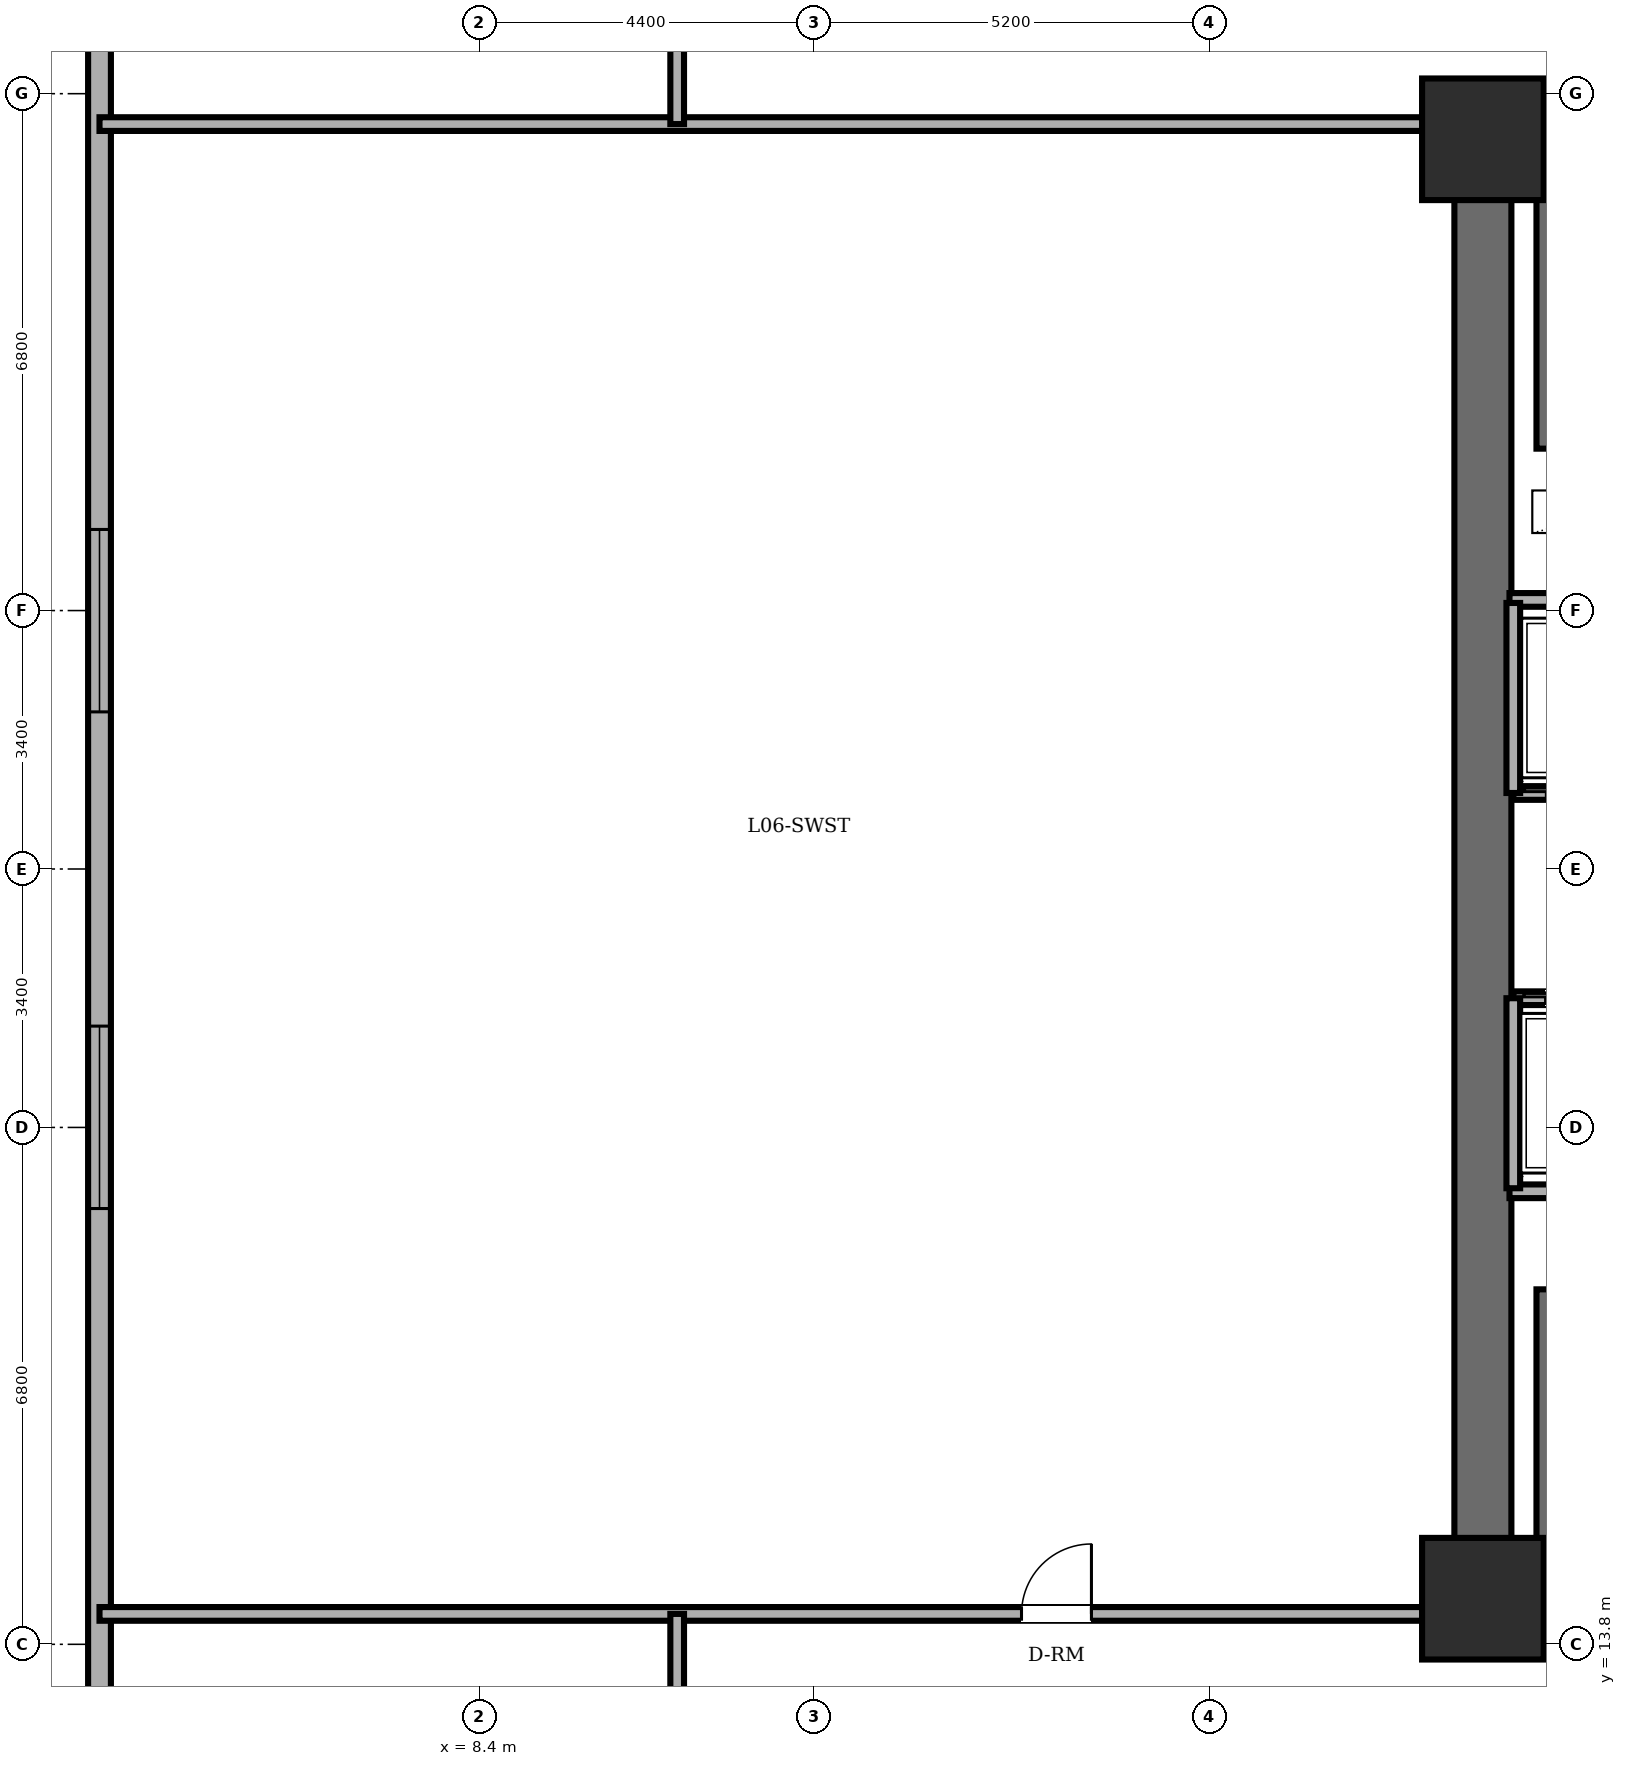
"""IFC4 building model, lengths in metres.
Left out: names, types, materials, properties, quantities, classifications, styles, units other than length and angle.
Written with IfcOpenShell. Run it as: python <this file> out.ifc"""

import sys

from ifc_helpers import new_model, si_unit, direction, frame, frame_2d, origin, origin_2d, place, context, subcontext, project, spatial, rectangle, extrude, element, fill, save


model = new_model("IFC4")
c1 = context("Model", 3, precision=1e-05, world=origin(), true_north=direction((0.0, 1.0)))
c2 = subcontext(c1, "Body", "Model", "MODEL_VIEW")
j1 = project(units=[si_unit("LENGTHUNIT", "METRE"), si_unit("PLANEANGLEUNIT", "RADIAN")], contexts=[c1])
p1 = place(None, origin())
s1 = spatial("IfcSite", under=j1, at=p1, CompositionType="ELEMENT")
p2 = place(p1, origin())
s2 = spatial("IfcBuilding", under=s1, at=p2, CompositionType="ELEMENT")
p3 = place(p2, frame((0.0, 0.0, 24.0)))
s3 = spatial("IfcBuildingStorey", under=s2, at=p3, CompositionType="ELEMENT", Elevation=24.0)
for number, where, z_axis, x_axis in (
    (1, (21.6, 14.4, 0.0), (0.0, 0.0, 1.0), (1.0, 0.0, 0.0)),
    (2, (21.6, 33.6, 0.0), (0.0, 0.0, 1.0), (1.0, 0.0, 0.0)),
):
    element("IfcColumn", number, at=place(p3, frame(where, z_axis=z_axis, x_axis=x_axis)), inside=s3, PredefinedType="COLUMN", context=c2, shape_type="SweptSolid", body=[
        extrude(rectangle(XDim=1.6, YDim=1.6, at=origin_2d()), origin(), (0.0, 0.0, 1.0), 4.8),
    ])
p4 = place(p3, frame((3.4, 40.2, 0.0), z_axis=(0.0, 0.0, 1.0), x_axis=(0.0, -1.0, 0.0)))
e3 = element("IfcWall", 3, at=p4, inside=s3, PredefinedType="SOLIDWALL", context=c2, shape_type="SweptSolid", body=[
    extrude(rectangle(XDim=32.4, YDim=0.3, at=frame_2d((16.2, 0.0))), origin(), (0.0, 0.0, 1.0), 4.6),
])
p5 = place(p4, frame((2.175, 0.0, 0.85)))
e4 = element("IfcOpeningElement", 4, at=p5, cuts=e3, PredefinedType="OPENING", context=c2, shape_type="SweptSolid", body=[
    extrude(rectangle(XDim=2.4, YDim=2.1, at=frame_2d((1.2, 1.05))), frame((0.0, 0.16, 0.0), z_axis=(0.0, -1.0, 0.0), x_axis=(1.0, 0.0, 0.0)), (0.0, 0.0, 1.0), 0.32),
])
p6 = place(p4, frame((11.733, 0.0, 0.85)))
e5 = element("IfcOpeningElement", 5, at=p6, cuts=e3, PredefinedType="OPENING", context=c2, shape_type="SweptSolid", body=[
    extrude(rectangle(XDim=2.4, YDim=2.1, at=frame_2d((1.2, 1.05))), frame((0.0, 0.16, 0.0), z_axis=(0.0, -1.0, 0.0), x_axis=(1.0, 0.0, 0.0)), (0.0, 0.0, 1.0), 0.32),
])
p7 = place(p4, frame((18.267, 0.0, 0.85)))
e6 = element("IfcOpeningElement", 6, at=p7, cuts=e3, PredefinedType="OPENING", context=c2, shape_type="SweptSolid", body=[
    extrude(rectangle(XDim=2.4, YDim=2.1, at=frame_2d((1.2, 1.05))), frame((0.0, 0.16, 0.0), z_axis=(0.0, -1.0, 0.0), x_axis=(1.0, 0.0, 0.0)), (0.0, 0.0, 1.0), 0.32),
])
p8 = place(p4, frame((27.825, 0.0, 0.85)))
e7 = element("IfcOpeningElement", 7, at=p8, cuts=e3, PredefinedType="OPENING", context=c2, shape_type="SweptSolid", body=[
    extrude(rectangle(XDim=2.4, YDim=2.1, at=frame_2d((1.2, 1.05))), frame((0.0, 0.16, 0.0), z_axis=(0.0, -1.0, 0.0), x_axis=(1.0, 0.0, 0.0)), (0.0, 0.0, 1.0), 0.32),
])
p9 = place(p3, frame((21.6, 14.4, 0.0), z_axis=(0.0, 0.0, 1.0), x_axis=(0.0, 1.0, 0.0)))
e8 = element("IfcWall", 8, at=p9, inside=s3, PredefinedType="SHEAR", context=c2, shape_type="SweptSolid", body=[
    extrude(rectangle(XDim=19.2, YDim=0.75, at=frame_2d((9.6, 0.0))), origin(), (0.0, 0.0, 1.0), 4.6),
])
for number, where, z_axis, x_axis in (
    (9, (21.6, 33.6, 0.0), (0.0, 0.0, 1.0), (1.0, 0.0, 0.0)),
    (10, (37.2, 14.4, 0.0), (0.0, 0.0, 1.0), (-1.0, 0.0, 0.0)),
):
    element("IfcWall", number, at=place(p3, frame(where, z_axis=z_axis, x_axis=x_axis)), inside=s3, PredefinedType="SHEAR", context=c2, shape_type="SweptSolid", body=[
        extrude(rectangle(XDim=15.6, YDim=0.75, at=frame_2d((7.8, 0.0))), origin(), (0.0, 0.0, 1.0), 4.6),
    ])
for number, where, z_axis, x_axis in (
    (11, (22.48, 29.53, 0.0), (0.0, 0.0, 1.0), (0.0, 1.0, 0.0)),
    (12, (22.48, 14.89, 0.0), (0.0, 0.0, 1.0), (0.0, 1.0, 0.0)),
):
    element("IfcWall", number, at=place(p3, frame(where, z_axis=z_axis, x_axis=x_axis)), inside=s3, PredefinedType="SOLIDWALL", context=c2, shape_type="SweptSolid", body=[
        extrude(rectangle(XDim=3.58, YDim=0.35, at=frame_2d((1.79, 0.0))), origin(), (0.0, 0.0, 1.0), 4.6),
    ])
p10 = place(p3, frame((21.95, 27.54, 0.0), z_axis=(0.0, 0.0, 1.0), x_axis=(1.0, 0.0, 0.0)))
e13 = element("IfcWall", 13, at=p10, inside=s3, PredefinedType="PARTITIONING", context=c2, shape_type="SweptSolid", body=[
    extrude(rectangle(XDim=10.56, YDim=0.18, at=frame_2d((5.28, 0.0))), origin(), (0.0, 0.0, 1.0), 4.6),
])
p11 = place(p3, frame((21.95, 19.76, 0.0), z_axis=(0.0, 0.0, 1.0), x_axis=(1.0, 0.0, 0.0)))
e14 = element("IfcWall", 14, at=p11, inside=s3, PredefinedType="PARTITIONING", context=c2, shape_type="SweptSolid", body=[
    extrude(rectangle(XDim=14.87, YDim=0.18, at=frame_2d((7.435, 0.0))), origin(), (0.0, 0.0, 1.0), 4.6),
])
p12 = place(p3, frame((24.02, 25.0, 0.0), z_axis=(0.0, 0.0, 1.0), x_axis=(-1.0, 0.0, 0.0)))
e15 = element("IfcWall", 15, at=p12, inside=s3, PredefinedType="PARTITIONING", context=c2, shape_type="SweptSolid", body=[
    extrude(rectangle(XDim=2.02, YDim=0.18, at=frame_2d((1.01, 0.0))), origin(), (0.0, 0.0, 1.0), 4.6),
])
p13 = place(p12, frame((0.435, 0.0, 0.0)))
e16 = element("IfcOpeningElement", 16, at=p13, cuts=e15, PredefinedType="OPENING", context=c2, shape_type="SweptSolid", body=[
    extrude(rectangle(XDim=1.15, YDim=2.2, at=frame_2d((0.575, 1.1))), frame((0.0, 0.1, 0.0), z_axis=(0.0, -1.0, 0.0), x_axis=(1.0, 0.0, 0.0)), (0.0, 0.0, 1.0), 0.2),
])
p14 = place(p3, frame((22.0, 27.5, 0.0), z_axis=(0.0, 0.0, 1.0), x_axis=(0.0, -1.0, 0.0)))
e17 = element("IfcWall", 17, at=p14, inside=s3, PredefinedType="PARTITIONING", context=c2, shape_type="SweptSolid", body=[
    extrude(rectangle(XDim=2.5, YDim=0.18, at=frame_2d((1.25, 0.0))), origin(), (0.0, 0.0, 1.0), 4.6),
])
p15 = place(p3, frame((22.0, 22.3, 0.0), z_axis=(0.0, 0.0, 1.0), x_axis=(1.0, 0.0, 0.0)))
e18 = element("IfcWall", 18, at=p15, inside=s3, PredefinedType="PARTITIONING", context=c2, shape_type="SweptSolid", body=[
    extrude(rectangle(XDim=2.0, YDim=0.18, at=frame_2d((1.0, 0.0))), origin(), (0.0, 0.0, 1.0), 4.6),
])
p16 = place(p15, frame((0.425, 0.0, 0.0)))
e19 = element("IfcOpeningElement", 19, at=p16, cuts=e18, PredefinedType="OPENING", context=c2, shape_type="SweptSolid", body=[
    extrude(rectangle(XDim=1.15, YDim=2.2, at=frame_2d((0.575, 1.1))), frame((0.0, 0.1, 0.0), z_axis=(0.0, -1.0, 0.0), x_axis=(1.0, 0.0, 0.0)), (0.0, 0.0, 1.0), 0.2),
])
p17 = place(p3, frame((22.0, 22.3, 0.0), z_axis=(0.0, 0.0, 1.0), x_axis=(0.0, -1.0, 0.0)))
e20 = element("IfcWall", 20, at=p17, inside=s3, PredefinedType="PARTITIONING", context=c2, shape_type="SweptSolid", body=[
    extrude(rectangle(XDim=2.5, YDim=0.18, at=frame_2d((1.25, 0.0))), origin(), (0.0, 0.0, 1.0), 4.6),
])
p18 = place(p3, frame((3.4, 14.2, 0.0), z_axis=(0.0, 0.0, 1.0), x_axis=(1.0, 0.0, 0.0)))
e21 = element("IfcWall", 21, at=p18, inside=s3, PredefinedType="PARTITIONING", context=c2, shape_type="SweptSolid", body=[
    extrude(rectangle(XDim=18.1, YDim=0.18, at=frame_2d((9.05, 0.0))), origin(), (0.0, 0.0, 1.0), 4.6),
])
p19 = place(p18, frame((12.13, 0.0, 0.0)))
e22 = element("IfcOpeningElement", 22, at=p19, cuts=e21, PredefinedType="OPENING", context=c2, shape_type="SweptSolid", body=[
    extrude(rectangle(XDim=0.92, YDim=2.1, at=frame_2d((0.46, 1.05))), frame((0.0, 0.1, 0.0), z_axis=(0.0, -1.0, 0.0), x_axis=(1.0, 0.0, 0.0)), (0.0, 0.0, 1.0), 0.2),
])
p20 = place(p3, frame((3.4, 33.8, 0.0), z_axis=(0.0, 0.0, 1.0), x_axis=(1.0, 0.0, 0.0)))
e23 = element("IfcWall", 23, at=p20, inside=s3, PredefinedType="PARTITIONING", context=c2, shape_type="SweptSolid", body=[
    extrude(rectangle(XDim=18.1, YDim=0.18, at=frame_2d((9.05, 0.0))), origin(), (0.0, 0.0, 1.0), 4.6),
])
for number, where, z_axis, x_axis in (
    (24, (11.0, 11.8, 0.0), (0.0, 0.0, 1.0), (0.0, 1.0, 0.0)),
    (25, (11.0, 33.8, 0.0), (0.0, 0.0, 1.0), (0.0, 1.0, 0.0)),
):
    element("IfcWall", number, at=place(p3, frame(where, z_axis=z_axis, x_axis=x_axis)), inside=s3, PredefinedType="PARTITIONING", context=c2, shape_type="SweptSolid", body=[
        extrude(rectangle(XDim=2.4, YDim=0.18, at=frame_2d((1.2, 0.0))), origin(), (0.0, 0.0, 1.0), 4.6),
    ])
p21 = place(p6, origin())
e26 = element("IfcWindow", 26, at=p21, inside=s3, PartitioningType="TRIPLE_PANEL_VERTICAL", PredefinedType="WINDOW", context=c2, shape_type="SweptSolid", body=[
    extrude(rectangle(XDim=2.4, YDim=2.1, at=frame_2d((1.2, 1.05))), frame((0.0, 0.03, 0.0), z_axis=(0.0, -1.0, 0.0), x_axis=(1.0, 0.0, 0.0)), (0.0, 0.0, 1.0), 0.06),
])
fill(e5, e26)
p22 = place(p7, origin())
e27 = element("IfcWindow", 27, at=p22, inside=s3, PartitioningType="TRIPLE_PANEL_VERTICAL", PredefinedType="WINDOW", context=c2, shape_type="SweptSolid", body=[
    extrude(rectangle(XDim=2.4, YDim=2.1, at=frame_2d((1.2, 1.05))), frame((0.0, 0.03, 0.0), z_axis=(0.0, -1.0, 0.0), x_axis=(1.0, 0.0, 0.0)), (0.0, 0.0, 1.0), 0.06),
])
fill(e6, e27)
p23 = place(p16, origin())
e28 = element("IfcDoor", 28, at=p23, inside=s3, OperationType="DOUBLE_DOOR_SLIDING", PredefinedType="DOOR", context=c2, shape_type="SweptSolid", body=[
    extrude(rectangle(XDim=1.15, YDim=2.2, at=frame_2d((0.575, 1.1))), frame((0.0, 0.025, 0.0), z_axis=(0.0, -1.0, 0.0), x_axis=(1.0, 0.0, 0.0)), (0.0, 0.0, 1.0), 0.05),
])
fill(e19, e28)
p24 = place(p19, origin())
e29 = element("IfcDoor", 29, at=p24, inside=s3, OperationType="SINGLE_SWING_RIGHT", PredefinedType="DOOR", context=c2, shape_type="SweptSolid", body=[
    extrude(rectangle(XDim=0.92, YDim=2.1, at=frame_2d((0.46, 1.05))), frame((0.0, 0.025, 0.0), z_axis=(0.0, -1.0, 0.0), x_axis=(1.0, 0.0, 0.0)), (0.0, 0.0, 1.0), 0.05),
])
fill(e22, e29)
save(model, sys.argv[1])
